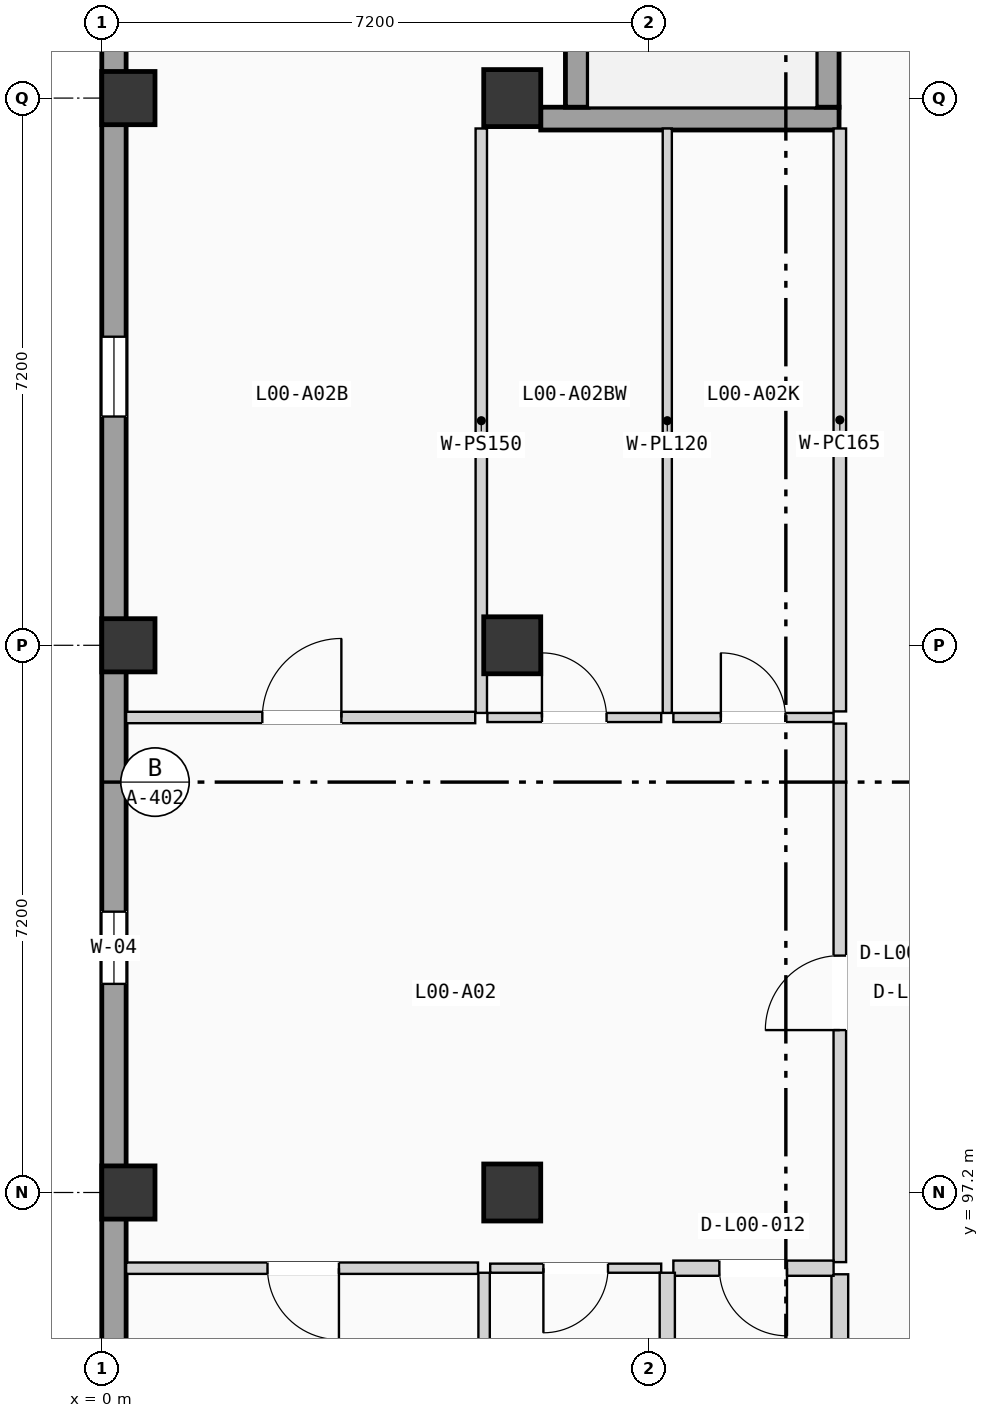
"""IFC4 building model, lengths in metres.
Left out: names, types, materials, properties, quantities, classifications, styles, units other than length and angle.
Written with IfcOpenShell. Run it as: python <this file> out.ifc"""

import sys

from ifc_helpers import new_model, si_unit, direction, frame, frame_2d, origin, origin_2d, place, context, subcontext, project, spatial, rectangle, extrude, element, fill, save


model = new_model("IFC4")
c1 = context("Model", 3, precision=1e-05, world=origin(), true_north=direction((0.0, 1.0)))
c2 = subcontext(c1, "Body", "Model", "MODEL_VIEW")
j1 = project(units=[si_unit("LENGTHUNIT", "METRE"), si_unit("PLANEANGLEUNIT", "RADIAN")], contexts=[c1])
p1 = place(None, origin())
s1 = spatial("IfcSite", under=j1, at=p1, CompositionType="ELEMENT")
p2 = place(p1, origin())
s2 = spatial("IfcBuilding", under=s1, at=p2, CompositionType="ELEMENT")
p3 = place(p2, origin())
s3 = spatial("IfcBuildingStorey", under=s2, at=p3, CompositionType="ELEMENT", Elevation=0.0)
for number, where, z_axis, x_axis in (
    (1, (0.35, 97.2, 0.0), (0.0, 0.0, 1.0), (1.0, 0.0, 0.0)),
    (2, (0.35, 104.4, 0.0), (0.0, 0.0, 1.0), (1.0, 0.0, 0.0)),
    (3, (0.35, 111.6, 0.0), (0.0, 0.0, 1.0), (1.0, 0.0, 0.0)),
):
    element("IfcColumn", number, at=place(p3, frame(where, z_axis=z_axis, x_axis=x_axis)), inside=s3, PredefinedType="COLUMN", context=c2, shape_type="SweptSolid", body=[
        extrude(rectangle(XDim=0.7, YDim=0.7, at=origin_2d()), origin(), (0.0, 0.0, 1.0), 4.9),
    ])
for number, where, z_axis, x_axis in (
    (4, (5.4, 97.2, 0.0), (0.0, 0.0, 1.0), (1.0, 0.0, 0.0)),
    (5, (5.4, 104.4, 0.0), (0.0, 0.0, 1.0), (1.0, 0.0, 0.0)),
    (6, (5.4, 111.6, 0.0), (0.0, 0.0, 1.0), (1.0, 0.0, 0.0)),
):
    element("IfcColumn", number, at=place(p3, frame(where, z_axis=z_axis, x_axis=x_axis)), inside=s3, PredefinedType="COLUMN", context=c2, shape_type="SweptSolid", body=[
        extrude(rectangle(XDim=0.75, YDim=0.75, at=origin_2d()), origin(), (0.0, 0.0, 1.0), 4.9),
    ])
p4 = place(p3, frame((0.16, 68.72, 0.0), z_axis=(0.0, 0.0, 1.0), x_axis=(0.0, 1.0, 0.0)))
e7 = element("IfcWall", 7, at=p4, inside=s3, PredefinedType="SOLIDWALL", context=c2, shape_type="SweptSolid", body=[
    extrude(rectangle(XDim=49.76, YDim=0.32, at=frame_2d((24.88, 0.0))), origin(), (0.0, 0.0, 1.0), 4.64),
])
p5 = place(p4, frame((12.169, 0.0, 0.9)))
e8 = element("IfcOpeningElement", 8, at=p5, cuts=e7, PredefinedType="OPENING", context=c2, shape_type="SweptSolid", body=[
    extrude(rectangle(XDim=0.95, YDim=1.2, at=frame_2d((0.475, 0.6))), frame((0.0, 0.17, 0.0), z_axis=(0.0, -1.0, 0.0), x_axis=(1.0, 0.0, 0.0)), (0.0, 0.0, 1.0), 0.34),
])
p6 = place(p4, frame((8.825, 0.0, 0.9)))
e9 = element("IfcOpeningElement", 9, at=p6, cuts=e7, PredefinedType="OPENING", context=c2, shape_type="SweptSolid", body=[
    extrude(rectangle(XDim=0.95, YDim=1.35, at=frame_2d((0.475, 0.675))), frame((0.0, 0.17, 0.0), z_axis=(0.0, -1.0, 0.0), x_axis=(1.0, 0.0, 0.0)), (0.0, 0.0, 1.0), 0.34),
])
p7 = place(p4, frame((18.072, 0.0, 0.9)))
e10 = element("IfcOpeningElement", 10, at=p7, cuts=e7, PredefinedType="OPENING", context=c2, shape_type="SweptSolid", body=[
    extrude(rectangle(XDim=0.95, YDim=1.5, at=frame_2d((0.475, 0.75))), frame((0.0, 0.17, 0.0), z_axis=(0.0, -1.0, 0.0), x_axis=(1.0, 0.0, 0.0)), (0.0, 0.0, 1.0), 0.34),
])
p8 = place(p4, frame((31.225, 0.0, 0.9)))
e11 = element("IfcOpeningElement", 11, at=p8, cuts=e7, PredefinedType="OPENING", context=c2, shape_type="SweptSolid", body=[
    extrude(rectangle(XDim=0.95, YDim=1.65, at=frame_2d((0.475, 0.825))), frame((0.0, 0.17, 0.0), z_axis=(0.0, -1.0, 0.0), x_axis=(1.0, 0.0, 0.0)), (0.0, 0.0, 1.0), 0.34),
])
p9 = place(p4, frame((24.002, 0.0, 0.9)))
e12 = element("IfcOpeningElement", 12, at=p9, cuts=e7, PredefinedType="OPENING", context=c2, shape_type="SweptSolid", body=[
    extrude(rectangle(XDim=0.95, YDim=1.8, at=frame_2d((0.475, 0.9))), frame((0.0, 0.17, 0.0), z_axis=(0.0, -1.0, 0.0), x_axis=(1.0, 0.0, 0.0)), (0.0, 0.0, 1.0), 0.34),
])
p10 = place(p4, frame((38.69, 0.0, 0.9)))
e13 = element("IfcOpeningElement", 13, at=p10, cuts=e7, PredefinedType="OPENING", context=c2, shape_type="SweptSolid", body=[
    extrude(rectangle(XDim=1.05, YDim=1.2, at=frame_2d((0.525, 0.6))), frame((0.0, 0.17, 0.0), z_axis=(0.0, -1.0, 0.0), x_axis=(1.0, 0.0, 0.0)), (0.0, 0.0, 1.0), 0.34),
])
p11 = place(p3, frame((5.775, 111.33, 0.0), z_axis=(0.0, 0.0, 1.0), x_axis=(1.0, 0.0, 0.0)))
e14 = element("IfcWall", 14, at=p11, inside=s3, PredefinedType="SHEAR", context=c2, shape_type="SweptSolid", body=[
    extrude(rectangle(XDim=3.925, YDim=0.3, at=frame_2d((1.962, 0.0))), origin(), (0.0, 0.0, 1.0), 4.64),
])
p12 = place(p3, frame((6.25, 111.48, 0.0), z_axis=(0.0, 0.0, 1.0), x_axis=(0.0, 1.0, 0.0)))
e15 = element("IfcWall", 15, at=p12, inside=s3, PredefinedType="SHEAR", context=c2, shape_type="SweptSolid", body=[
    extrude(rectangle(XDim=7.0, YDim=0.3, at=frame_2d((3.5, 0.0))), origin(), (0.0, 0.0, 1.0), 4.64),
])
p13 = place(p3, frame((9.55, 111.48, 0.0), z_axis=(0.0, 0.0, 1.0), x_axis=(0.0, 1.0, 0.0)))
e16 = element("IfcWall", 16, at=p13, inside=s3, PredefinedType="SHEAR", context=c2, shape_type="SweptSolid", body=[
    extrude(rectangle(XDim=7.0, YDim=0.3, at=frame_2d((3.5, 0.0))), origin(), (0.0, 0.0, 1.0), 4.64),
])
p14 = place(p13, frame((5.625, 0.0, 0.0)))
e17 = element("IfcOpeningElement", 17, at=p14, cuts=e16, PredefinedType="OPENING", context=c2, shape_type="SweptSolid", body=[
    extrude(rectangle(XDim=1.15, YDim=2.12, at=frame_2d((0.575, 1.06))), frame((0.0, 0.16, 0.0), z_axis=(0.0, -1.0, 0.0), x_axis=(1.0, 0.0, 0.0)), (0.0, 0.0, 1.0), 0.32),
])
p15 = place(p3, frame((9.71, 96.284, 0.0), z_axis=(0.0, 0.0, 1.0), x_axis=(0.0, 1.0, 0.0)))
e18 = element("IfcWall", 18, at=p15, inside=s3, PredefinedType="PARTITIONING", context=c2, shape_type="SweptSolid", body=[
    extrude(rectangle(XDim=7.086, YDim=0.165, at=frame_2d((3.543, 0.0))), origin(), (0.0, 0.0, 1.0), 3.84),
])
p16 = place(p15, frame((3.053, 0.0, 0.0)))
e19 = element("IfcOpeningElement", 19, at=p16, cuts=e18, PredefinedType="OPENING", context=c2, shape_type="SweptSolid", body=[
    extrude(rectangle(XDim=0.98, YDim=2.08, at=frame_2d((0.49, 1.04))), frame((0.0, 0.093, 0.0), z_axis=(0.0, -1.0, 0.0), x_axis=(1.0, 0.0, 0.0)), (0.0, 0.0, 1.0), 0.185),
])
p17 = place(p3, frame((9.71, 89.466, 0.0), z_axis=(0.0, 0.0, 1.0), x_axis=(0.0, 1.0, 0.0)))
e20 = element("IfcWall", 20, at=p17, inside=s3, PredefinedType="PLUMBINGWALL", context=c2, shape_type="SweptSolid", body=[
    extrude(rectangle(XDim=6.658, YDim=0.22, at=frame_2d((3.329, 0.0))), origin(), (0.0, 0.0, 1.0), 3.84),
])
p18 = place(p3, frame((9.71, 103.53, 0.0), z_axis=(0.0, 0.0, 1.0), x_axis=(0.0, 1.0, 0.0)))
e21 = element("IfcWall", 21, at=p18, inside=s3, PredefinedType="PARTITIONING", context=c2, shape_type="SweptSolid", body=[
    extrude(rectangle(XDim=7.67, YDim=0.165, at=frame_2d((3.835, 0.0))), origin(), (0.0, 0.0, 1.0), 3.84),
])
p19 = place(p3, frame((7.52, 96.204, 0.0), z_axis=(0.0, 0.0, 1.0), x_axis=(1.0, 0.0, 0.0)))
e22 = element("IfcWall", 22, at=p19, inside=s3, PredefinedType="PLUMBINGWALL", context=c2, shape_type="SweptSolid", body=[
    extrude(rectangle(XDim=2.108, YDim=0.2, at=frame_2d((1.054, 0.0))), origin(), (0.0, 0.0, 1.0), 3.84),
])
p20 = place(p19, frame((0.605, 0.0, 0.0)))
e23 = element("IfcOpeningElement", 23, at=p20, cuts=e22, PredefinedType="OPENING", context=c2, shape_type="SweptSolid", body=[
    extrude(rectangle(XDim=0.89, YDim=2.03, at=frame_2d((0.445, 1.015))), frame((0.0, 0.11, 0.0), z_axis=(0.0, -1.0, 0.0), x_axis=(1.0, 0.0, 0.0)), (0.0, 0.0, 1.0), 0.22),
])
p21 = place(p3, frame((7.52, 103.45, 0.0), z_axis=(0.0, 0.0, 1.0), x_axis=(1.0, 0.0, 0.0)))
e24 = element("IfcWall", 24, at=p21, inside=s3, PredefinedType="PARTITIONING", context=c2, shape_type="SweptSolid", body=[
    extrude(rectangle(XDim=2.108, YDim=0.12, at=frame_2d((1.054, 0.0))), origin(), (0.0, 0.0, 1.0), 3.84),
])
p22 = place(p21, frame((0.625, 0.0, 0.0)))
e25 = element("IfcOpeningElement", 25, at=p22, cuts=e24, PredefinedType="OPENING", context=c2, shape_type="SweptSolid", body=[
    extrude(rectangle(XDim=0.85, YDim=2.01, at=frame_2d((0.425, 1.005))), frame((0.0, 0.07, 0.0), z_axis=(0.0, -1.0, 0.0), x_axis=(1.0, 0.0, 0.0)), (0.0, 0.0, 1.0), 0.14),
])
p23 = place(p3, frame((0.32, 96.204, 0.0), z_axis=(0.0, 0.0, 1.0), x_axis=(1.0, 0.0, 0.0)))
e26 = element("IfcWall", 26, at=p23, inside=s3, PredefinedType="PARTITIONING", context=c2, shape_type="SweptSolid", body=[
    extrude(rectangle(XDim=4.63, YDim=0.15, at=frame_2d((2.315, 0.0))), origin(), (0.0, 0.0, 1.0), 3.84),
])
p24 = place(p23, frame((1.86, 0.0, 0.0)))
e27 = element("IfcOpeningElement", 27, at=p24, cuts=e26, PredefinedType="OPENING", context=c2, shape_type="SweptSolid", body=[
    extrude(rectangle(XDim=0.94, YDim=2.06, at=frame_2d((0.47, 1.03))), frame((0.0, 0.085, 0.0), z_axis=(0.0, -1.0, 0.0), x_axis=(1.0, 0.0, 0.0)), (0.0, 0.0, 1.0), 0.17),
])
p25 = place(p3, frame((5.11, 96.204, 0.0), z_axis=(0.0, 0.0, 1.0), x_axis=(1.0, 0.0, 0.0)))
e28 = element("IfcWall", 28, at=p25, inside=s3, PredefinedType="PARTITIONING", context=c2, shape_type="SweptSolid", body=[
    extrude(rectangle(XDim=2.25, YDim=0.12, at=frame_2d((1.125, 0.0))), origin(), (0.0, 0.0, 1.0), 3.84),
])
p26 = place(p25, frame((0.7, 0.0, 0.0)))
e29 = element("IfcOpeningElement", 29, at=p26, cuts=e28, PredefinedType="OPENING", context=c2, shape_type="SweptSolid", body=[
    extrude(rectangle(XDim=0.85, YDim=2.01, at=frame_2d((0.425, 1.005))), frame((0.0, 0.07, 0.0), z_axis=(0.0, -1.0, 0.0), x_axis=(1.0, 0.0, 0.0)), (0.0, 0.0, 1.0), 0.14),
])
p27 = place(p3, frame((0.32, 103.45, 0.0), z_axis=(0.0, 0.0, 1.0), x_axis=(1.0, 0.0, 0.0)))
e30 = element("IfcWall", 30, at=p27, inside=s3, PredefinedType="PARTITIONING", context=c2, shape_type="SweptSolid", body=[
    extrude(rectangle(XDim=4.593, YDim=0.15, at=frame_2d((2.296, 0.0))), origin(), (0.0, 0.0, 1.0), 3.84),
])
p28 = place(p27, frame((1.792, 0.0, 0.0)))
e31 = element("IfcOpeningElement", 31, at=p28, cuts=e30, PredefinedType="OPENING", context=c2, shape_type="SweptSolid", body=[
    extrude(rectangle(XDim=1.04, YDim=2.08, at=frame_2d((0.52, 1.04))), frame((0.0, 0.085, 0.0), z_axis=(0.0, -1.0, 0.0), x_axis=(1.0, 0.0, 0.0)), (0.0, 0.0, 1.0), 0.17),
])
p29 = place(p3, frame((5.073, 103.45, 0.0), z_axis=(0.0, 0.0, 1.0), x_axis=(1.0, 0.0, 0.0)))
e32 = element("IfcWall", 32, at=p29, inside=s3, PredefinedType="PARTITIONING", context=c2, shape_type="SweptSolid", body=[
    extrude(rectangle(XDim=2.287, YDim=0.12, at=frame_2d((1.144, 0.0))), origin(), (0.0, 0.0, 1.0), 3.84),
])
p30 = place(p29, frame((0.718, 0.0, 0.0)))
e33 = element("IfcOpeningElement", 33, at=p30, cuts=e32, PredefinedType="OPENING", context=c2, shape_type="SweptSolid", body=[
    extrude(rectangle(XDim=0.85, YDim=2.01, at=frame_2d((0.425, 1.005))), frame((0.0, 0.07, 0.0), z_axis=(0.0, -1.0, 0.0), x_axis=(1.0, 0.0, 0.0)), (0.0, 0.0, 1.0), 0.14),
])
p31 = place(p3, frame((7.44, 89.466, 0.0), z_axis=(0.0, 0.0, 1.0), x_axis=(0.0, 1.0, 0.0)))
e34 = element("IfcWall", 34, at=p31, inside=s3, PredefinedType="PLUMBINGWALL", context=c2, shape_type="SweptSolid", body=[
    extrude(rectangle(XDim=6.678, YDim=0.2, at=frame_2d((3.339, 0.0))), origin(), (0.0, 0.0, 1.0), 3.84),
])
p32 = place(p31, frame((2.904, 0.0, 0.0)))
e35 = element("IfcOpeningElement", 35, at=p32, cuts=e34, PredefinedType="OPENING", context=c2, shape_type="SweptSolid", body=[
    extrude(rectangle(XDim=0.85, YDim=2.01, at=frame_2d((0.425, 1.005))), frame((0.0, 0.11, 0.0), z_axis=(0.0, -1.0, 0.0), x_axis=(1.0, 0.0, 0.0)), (0.0, 0.0, 1.0), 0.22),
])
p33 = place(p3, frame((7.44, 103.51, 0.0), z_axis=(0.0, 0.0, 1.0), x_axis=(0.0, 1.0, 0.0)))
e36 = element("IfcWall", 36, at=p33, inside=s3, PredefinedType="PARTITIONING", context=c2, shape_type="SweptSolid", body=[
    extrude(rectangle(XDim=7.69, YDim=0.12, at=frame_2d((3.845, 0.0))), origin(), (0.0, 0.0, 1.0), 3.84),
])
p34 = place(p3, frame((5.03, 89.466, 0.0), z_axis=(0.0, 0.0, 1.0), x_axis=(0.0, 1.0, 0.0)))
e37 = element("IfcWall", 37, at=p34, inside=s3, PredefinedType="PARTITIONING", context=c2, shape_type="SweptSolid", body=[
    extrude(rectangle(XDim=6.678, YDim=0.15, at=frame_2d((3.339, 0.0))), origin(), (0.0, 0.0, 1.0), 3.84),
])
p35 = place(p3, frame((4.993, 103.51, 0.0), z_axis=(0.0, 0.0, 1.0), x_axis=(0.0, 1.0, 0.0)))
e38 = element("IfcWall", 38, at=p35, inside=s3, PredefinedType="PARTITIONING", context=c2, shape_type="SweptSolid", body=[
    extrude(rectangle(XDim=7.69, YDim=0.15, at=frame_2d((3.845, 0.0))), origin(), (0.0, 0.0, 1.0), 3.84),
])
p36 = place(p8, origin())
e39 = element("IfcWindow", 39, at=p36, inside=s3, PartitioningType="SINGLE_PANEL", PredefinedType="WINDOW", context=c2, shape_type="SweptSolid", body=[
    extrude(rectangle(XDim=0.95, YDim=1.65, at=frame_2d((0.475, 0.825))), frame((0.0, 0.03, 0.0), z_axis=(0.0, -1.0, 0.0), x_axis=(1.0, 0.0, 0.0)), (0.0, 0.0, 1.0), 0.06),
])
fill(e11, e39)
p37 = place(p10, origin())
e40 = element("IfcWindow", 40, at=p37, inside=s3, PartitioningType="SINGLE_PANEL", PredefinedType="WINDOW", context=c2, shape_type="SweptSolid", body=[
    extrude(rectangle(XDim=1.05, YDim=1.2, at=frame_2d((0.525, 0.6))), frame((0.0, 0.03, 0.0), z_axis=(0.0, -1.0, 0.0), x_axis=(1.0, 0.0, 0.0)), (0.0, 0.0, 1.0), 0.06),
])
fill(e13, e40)
p38 = place(p16, origin())
e41 = element("IfcDoor", 41, at=p38, inside=s3, OperationType="SINGLE_SWING_LEFT", PredefinedType="DOOR", context=c2, shape_type="SweptSolid", body=[
    extrude(rectangle(XDim=0.98, YDim=2.08, at=frame_2d((0.49, 1.04))), frame((0.0, 0.025, 0.0), z_axis=(0.0, -1.0, 0.0), x_axis=(1.0, 0.0, 0.0)), (0.0, 0.0, 1.0), 0.05),
])
fill(e19, e41)
p39 = place(p20, frame((0.89, 0.0, 0.0), z_axis=(0.0, 0.0, 1.0), x_axis=(-1.0, 0.0, 0.0)))
e42 = element("IfcDoor", 42, at=p39, inside=s3, OperationType="SINGLE_SWING_RIGHT", PredefinedType="DOOR", context=c2, shape_type="SweptSolid", body=[
    extrude(rectangle(XDim=0.89, YDim=2.03, at=frame_2d((0.445, 1.015))), frame((0.0, 0.025, 0.0), z_axis=(0.0, -1.0, 0.0), x_axis=(1.0, 0.0, 0.0)), (0.0, 0.0, 1.0), 0.05),
])
fill(e23, e42)
p40 = place(p22, origin())
e43 = element("IfcDoor", 43, at=p40, inside=s3, OperationType="SINGLE_SWING_LEFT", PredefinedType="DOOR", context=c2, shape_type="SweptSolid", body=[
    extrude(rectangle(XDim=0.85, YDim=2.01, at=frame_2d((0.425, 1.005))), frame((0.0, 0.025, 0.0), z_axis=(0.0, -1.0, 0.0), x_axis=(1.0, 0.0, 0.0)), (0.0, 0.0, 1.0), 0.05),
])
fill(e25, e43)
p41 = place(p24, frame((0.94, 0.0, 0.0), z_axis=(0.0, 0.0, 1.0), x_axis=(-1.0, 0.0, 0.0)))
e44 = element("IfcDoor", 44, at=p41, inside=s3, OperationType="SINGLE_SWING_RIGHT", PredefinedType="DOOR", context=c2, shape_type="SweptSolid", body=[
    extrude(rectangle(XDim=0.94, YDim=2.06, at=frame_2d((0.47, 1.03))), frame((0.0, 0.025, 0.0), z_axis=(0.0, -1.0, 0.0), x_axis=(1.0, 0.0, 0.0)), (0.0, 0.0, 1.0), 0.05),
])
fill(e27, e44)
p42 = place(p26, frame((0.85, 0.0, 0.0), z_axis=(0.0, 0.0, 1.0), x_axis=(-1.0, 0.0, 0.0)))
e45 = element("IfcDoor", 45, at=p42, inside=s3, OperationType="SINGLE_SWING_LEFT", PredefinedType="DOOR", context=c2, shape_type="SweptSolid", body=[
    extrude(rectangle(XDim=0.85, YDim=2.01, at=frame_2d((0.425, 1.005))), frame((0.0, 0.025, 0.0), z_axis=(0.0, -1.0, 0.0), x_axis=(1.0, 0.0, 0.0)), (0.0, 0.0, 1.0), 0.05),
])
fill(e29, e45)
p43 = place(p28, origin())
e46 = element("IfcDoor", 46, at=p43, inside=s3, OperationType="SINGLE_SWING_RIGHT", PredefinedType="DOOR", context=c2, shape_type="SweptSolid", body=[
    extrude(rectangle(XDim=1.04, YDim=2.08, at=frame_2d((0.52, 1.04))), frame((0.0, 0.025, 0.0), z_axis=(0.0, -1.0, 0.0), x_axis=(1.0, 0.0, 0.0)), (0.0, 0.0, 1.0), 0.05),
])
fill(e31, e46)
p44 = place(p30, origin())
e47 = element("IfcDoor", 47, at=p44, inside=s3, OperationType="SINGLE_SWING_LEFT", PredefinedType="DOOR", context=c2, shape_type="SweptSolid", body=[
    extrude(rectangle(XDim=0.85, YDim=2.01, at=frame_2d((0.425, 1.005))), frame((0.0, 0.025, 0.0), z_axis=(0.0, -1.0, 0.0), x_axis=(1.0, 0.0, 0.0)), (0.0, 0.0, 1.0), 0.05),
])
fill(e33, e47)
save(model, sys.argv[1])
